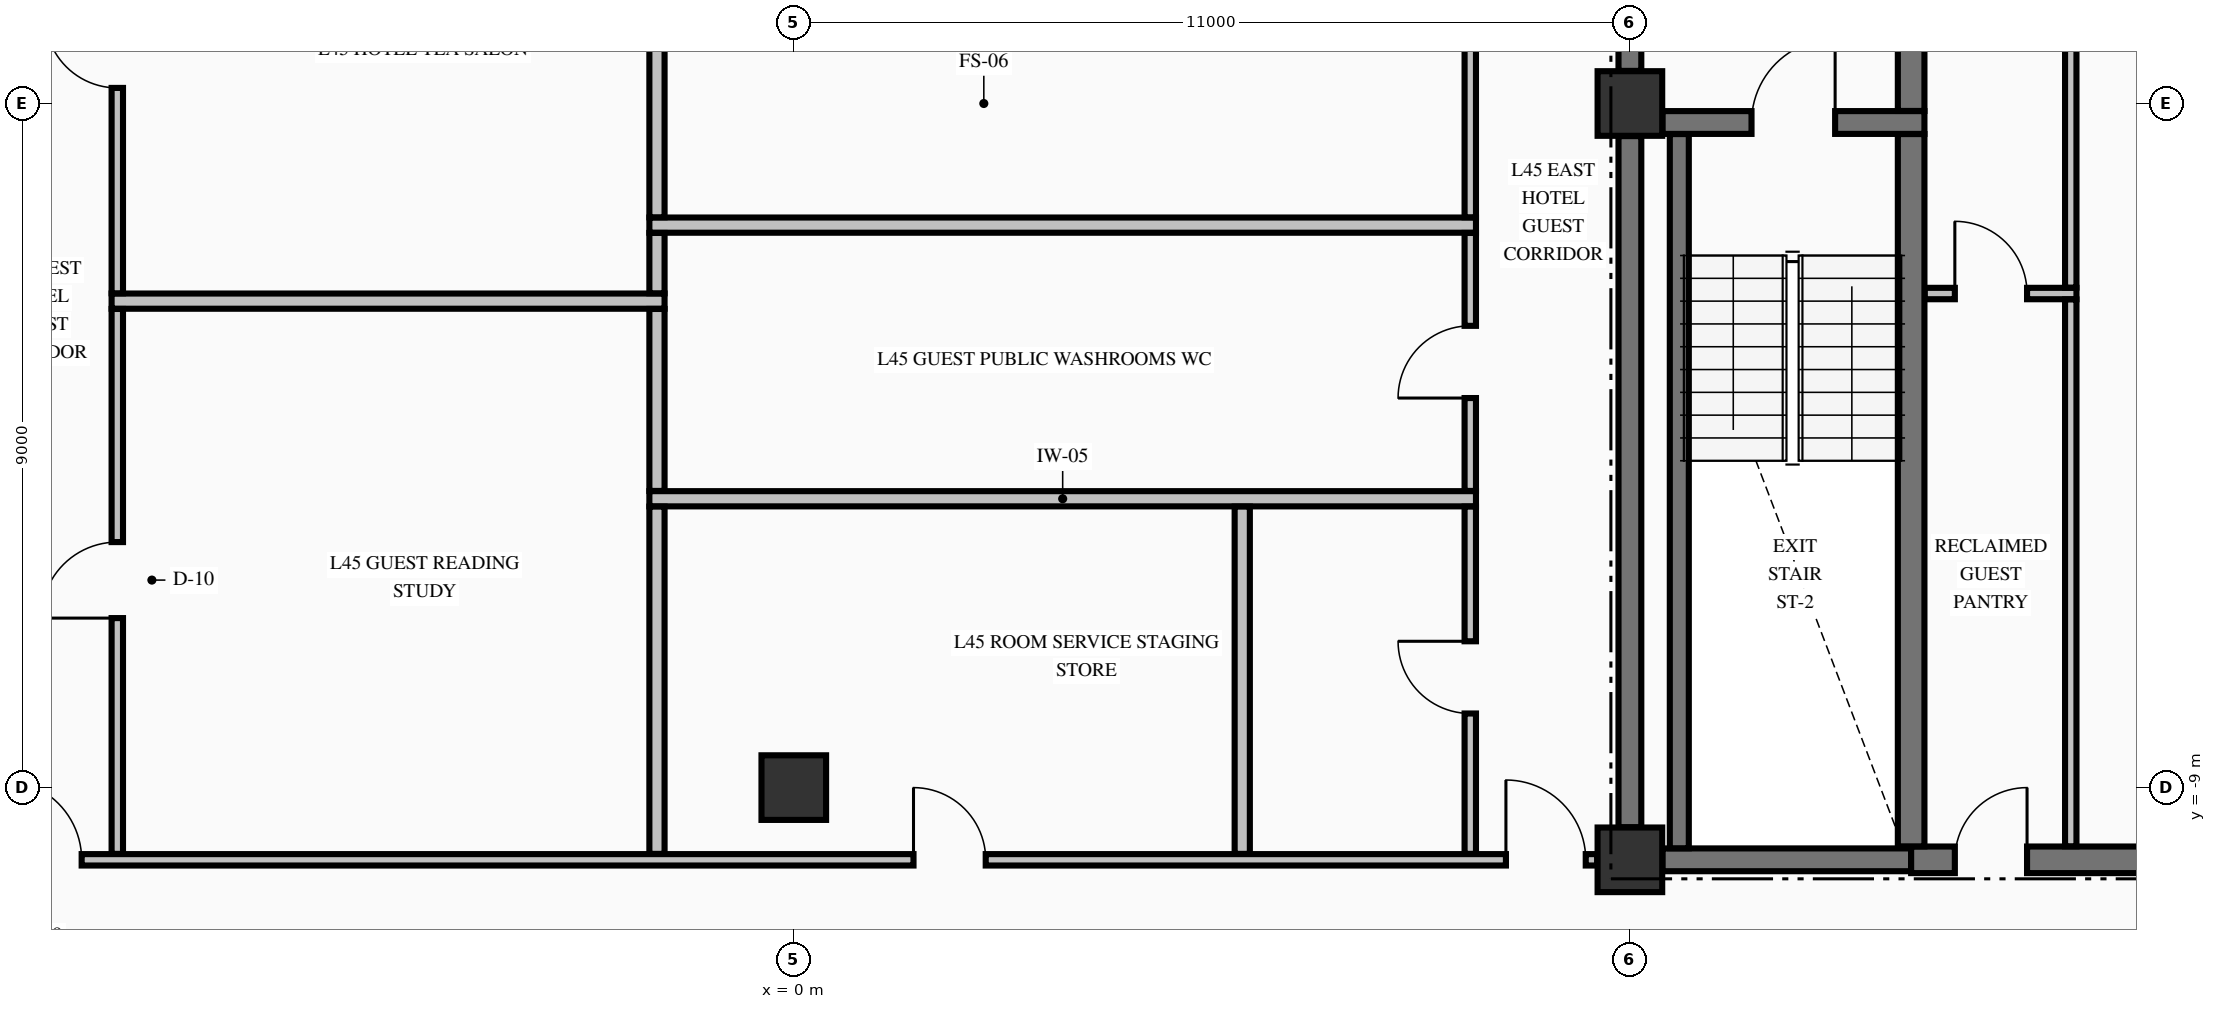
"""IFC4 building model, lengths in metres.
Left out: names, types, materials, properties, quantities, classifications, styles, units other than length and angle.
Written with IfcOpenShell. Run it as: python <this file> out.ifc"""

import sys

from ifc_helpers import new_model, si_unit, direction, frame, frame_2d, origin, origin_2d, place, context, subcontext, project, spatial, rectangle, extrude, element, fill, save


model = new_model("IFC4")
c1 = context("Model", 3, precision=1e-05, world=origin(), true_north=direction((0.0, 1.0)))
c2 = subcontext(c1, "Body", "Model", "MODEL_VIEW")
j1 = project(units=[si_unit("LENGTHUNIT", "METRE"), si_unit("PLANEANGLEUNIT", "RADIAN")], contexts=[c1])
p1 = place(None, origin())
s1 = spatial("IfcSite", under=j1, at=p1, CompositionType="ELEMENT")
p2 = place(p1, origin())
s2 = spatial("IfcBuilding", under=s1, at=p2, CompositionType="ELEMENT")
p3 = place(p2, frame((0.0, 0.0, 176.26)))
s3 = spatial("IfcBuildingStorey", under=s2, at=p3, CompositionType="ELEMENT", Elevation=176.26)
for number, where, z_axis, x_axis in (
    (1, (11.0, -9.95, -0.275), (0.0, 0.0, 1.0), (1.0, 0.0, 0.0)),
    (2, (11.0, 0.0, -0.275), (0.0, 0.0, 1.0), (1.0, 0.0, 0.0)),
    (3, (0.0, -9.0, -0.275), (0.0, 0.0, 1.0), (1.0, 0.0, 0.0)),
):
    element("IfcColumn", number, at=place(p3, frame(where, z_axis=z_axis, x_axis=x_axis)), inside=s3, PredefinedType="COLUMN", context=c2, shape_type="SweptSolid", body=[
        extrude(rectangle(XDim=0.85, YDim=0.85, at=origin_2d()), origin(), (0.0, 0.0, 1.0), 3.425),
    ])
p4 = place(p3, frame((11.429, -9.95, 0.0), z_axis=(0.0, 0.0, 1.0), x_axis=(1.0, 0.0, 0.0)))
e4 = element("IfcWall", 4, at=p4, inside=s3, PredefinedType="SHEAR", context=c2, shape_type="SweptSolid", body=[
    extrude(rectangle(XDim=3.271, YDim=0.3, at=frame_2d((1.635, 0.0))), origin(), (0.0, 0.0, 1.0), 3.15),
])
p5 = place(p3, frame((14.7, -9.95, 0.0), z_axis=(0.0, 0.0, 1.0), x_axis=(1.0, 0.0, 0.0)))
e5 = element("IfcWall", 5, at=p5, inside=s3, PredefinedType="SHEAR", context=c2, shape_type="SweptSolid", body=[
    extrude(rectangle(XDim=4.871, YDim=0.35, at=frame_2d((2.436, 0.0))), origin(), (0.0, 0.0, 1.0), 3.15),
])
p6 = place(p5, frame((3.25, 0.0, 0.0)))
e6 = element("IfcOpeningElement", 6, at=p6, cuts=e5, PredefinedType="OPENING", context=c2, shape_type="SweptSolid", body=[
    extrude(rectangle(XDim=0.9, YDim=2.15, at=frame_2d((0.45, 1.075))), frame((0.0, 0.185, 0.0), z_axis=(0.0, -1.0, 0.0), x_axis=(1.0, 0.0, 0.0)), (0.0, 0.0, 1.0), 0.37),
])
p7 = place(p5, frame((0.575, 0.0, 0.0)))
e7 = element("IfcOpeningElement", 7, at=p7, cuts=e5, PredefinedType="OPENING", context=c2, shape_type="SweptSolid", body=[
    extrude(rectangle(XDim=0.95, YDim=2.15, at=frame_2d((0.475, 1.075))), frame((0.0, 0.185, 0.0), z_axis=(0.0, -1.0, 0.0), x_axis=(1.0, 0.0, 0.0)), (0.0, 0.0, 1.0), 0.37),
])
p8 = place(p3, frame((11.429, -0.25, 0.0), z_axis=(0.0, 0.0, 1.0), x_axis=(1.0, 0.0, 0.0)))
e8 = element("IfcWall", 8, at=p8, inside=s3, PredefinedType="SHEAR", context=c2, shape_type="SweptSolid", body=[
    extrude(rectangle(XDim=3.446, YDim=0.3, at=frame_2d((1.723, 0.0))), origin(), (0.0, 0.0, 1.0), 3.15),
])
p9 = place(p8, frame((1.171, 0.0, 0.0)))
e9 = element("IfcOpeningElement", 9, at=p9, cuts=e8, PredefinedType="OPENING", context=c2, shape_type="SweptSolid", body=[
    extrude(rectangle(XDim=1.1, YDim=2.15, at=frame_2d((0.55, 1.075))), frame((0.0, 0.16, 0.0), z_axis=(0.0, -1.0, 0.0), x_axis=(1.0, 0.0, 0.0)), (0.0, 0.0, 1.0), 0.32),
])
p10 = place(p3, frame((-10.569, -9.95, 0.0), z_axis=(0.0, 0.0, 1.0), x_axis=(1.0, 0.0, 0.0)))
e10 = element("IfcWall", 10, at=p10, inside=s3, PredefinedType="PARTITIONING", context=c2, shape_type="SweptSolid", body=[
    extrude(rectangle(XDim=21.138, YDim=0.15, at=frame_2d((10.569, 0.0))), origin(), (0.0, 0.0, 1.0), 3.15),
])
p11 = place(p10, frame((0.15, 0.0, 0.0)))
e11 = element("IfcOpeningElement", 11, at=p11, cuts=e10, PredefinedType="OPENING", context=c2, shape_type="SweptSolid", body=[
    extrude(rectangle(XDim=1.05, YDim=2.15, at=frame_2d((0.525, 1.075))), frame((0.0, 0.085, 0.0), z_axis=(0.0, -1.0, 0.0), x_axis=(1.0, 0.0, 0.0)), (0.0, 0.0, 1.0), 0.17),
])
p12 = place(p10, frame((19.938, 0.0, 0.0)))
e12 = element("IfcOpeningElement", 12, at=p12, cuts=e10, PredefinedType="OPENING", context=c2, shape_type="SweptSolid", body=[
    extrude(rectangle(XDim=1.05, YDim=2.15, at=frame_2d((0.525, 1.075))), frame((0.0, 0.085, 0.0), z_axis=(0.0, -1.0, 0.0), x_axis=(1.0, 0.0, 0.0)), (0.0, 0.0, 1.0), 0.17),
])
p13 = place(p10, frame((12.144, 0.0, 0.0)))
e13 = element("IfcOpeningElement", 13, at=p13, cuts=e10, PredefinedType="OPENING", context=c2, shape_type="SweptSolid", body=[
    extrude(rectangle(XDim=0.95, YDim=2.15, at=frame_2d((0.475, 1.075))), frame((0.0, 0.085, 0.0), z_axis=(0.0, -1.0, 0.0), x_axis=(1.0, 0.0, 0.0)), (0.0, 0.0, 1.0), 0.17),
])
p14 = place(p3, frame((-1.9, -5.2, 0.0), z_axis=(0.0, 0.0, 1.0), x_axis=(1.0, 0.0, 0.0)))
e14 = element("IfcWall", 14, at=p14, inside=s3, PredefinedType="PARTITIONING", context=c2, shape_type="SweptSolid", body=[
    extrude(rectangle(XDim=10.875, YDim=0.2, at=frame_2d((5.438, 0.0))), origin(), (0.0, 0.0, 1.0), 3.15),
])
p15 = place(p3, frame((-8.975, -2.6, 0.0), z_axis=(0.0, 0.0, 1.0), x_axis=(1.0, 0.0, 0.0)))
e15 = element("IfcWall", 15, at=p15, inside=s3, PredefinedType="PARTITIONING", context=c2, shape_type="SweptSolid", body=[
    extrude(rectangle(XDim=7.275, YDim=0.2, at=frame_2d((3.638, 0.0))), origin(), (0.0, 0.0, 1.0), 3.15),
])
p16 = place(p3, frame((14.878, -2.5, 0.0), z_axis=(0.0, 0.0, 1.0), x_axis=(1.0, 0.0, 0.0)))
e16 = element("IfcWall", 16, at=p16, inside=s3, PredefinedType="PARTITIONING", context=c2, shape_type="SweptSolid", body=[
    extrude(rectangle(XDim=1.997, YDim=0.15, at=frame_2d((0.999, 0.0))), origin(), (0.0, 0.0, 1.0), 3.15),
])
p17 = place(p16, frame((0.397, 0.0, 0.0)))
e17 = element("IfcOpeningElement", 17, at=p17, cuts=e16, PredefinedType="OPENING", context=c2, shape_type="SweptSolid", body=[
    extrude(rectangle(XDim=0.95, YDim=2.15, at=frame_2d((0.475, 1.075))), frame((0.0, 0.085, 0.0), z_axis=(0.0, -1.0, 0.0), x_axis=(1.0, 0.0, 0.0)), (0.0, 0.0, 1.0), 0.17),
])
p18 = place(p3, frame((-1.9, -1.6, 0.0), z_axis=(0.0, 0.0, 1.0), x_axis=(1.0, 0.0, 0.0)))
e18 = element("IfcWall", 18, at=p18, inside=s3, PredefinedType="PARTITIONING", context=c2, shape_type="SweptSolid", body=[
    extrude(rectangle(XDim=10.875, YDim=0.2, at=frame_2d((5.438, 0.0))), origin(), (0.0, 0.0, 1.0), 3.15),
])
p19 = place(p3, frame((11.0, -9.521, 0.0), z_axis=(0.0, 0.0, 1.0), x_axis=(0.0, 1.0, 0.0)))
e19 = element("IfcWall", 19, at=p19, inside=s3, PredefinedType="SHEAR", context=c2, shape_type="SweptSolid", body=[
    extrude(rectangle(XDim=9.092, YDim=0.3, at=frame_2d((4.546, 0.0))), origin(), (0.0, 0.0, 1.0), 3.15),
])
p20 = place(p3, frame((11.0, 0.429, 0.0), z_axis=(0.0, 0.0, 1.0), x_axis=(0.0, 1.0, 0.0)))
e20 = element("IfcWall", 20, at=p20, inside=s3, PredefinedType="SHEAR", context=c2, shape_type="SweptSolid", body=[
    extrude(rectangle(XDim=2.319, YDim=0.3, at=frame_2d((1.16, 0.0))), origin(), (0.0, 0.0, 1.0), 3.15),
])
p21 = place(p20, frame((0.671, 0.0, 0.0)))
e21 = element("IfcOpeningElement", 21, at=p21, cuts=e20, PredefinedType="OPENING", context=c2, shape_type="SweptSolid", body=[
    extrude(rectangle(XDim=1.1, YDim=2.15, at=frame_2d((0.55, 1.075))), frame((0.0, 0.16, 0.0), z_axis=(0.0, -1.0, 0.0), x_axis=(1.0, 0.0, 0.0)), (0.0, 0.0, 1.0), 0.32),
])
p22 = place(p3, frame((11.65, -9.798, 0.0), z_axis=(0.0, 0.0, 1.0), x_axis=(0.0, 1.0, 0.0)))
e22 = element("IfcWall", 22, at=p22, inside=s3, PredefinedType="SOLIDWALL", context=c2, shape_type="SweptSolid", body=[
    extrude(rectangle(XDim=9.396, YDim=0.25, at=frame_2d((4.698, 0.0))), origin(), (0.0, 0.0, 1.0), 3.15),
])
p23 = place(p3, frame((14.7, -9.773, 0.0), z_axis=(0.0, 0.0, 1.0), x_axis=(0.0, 1.0, 0.0)))
e23 = element("IfcWall", 23, at=p23, inside=s3, PredefinedType="SHEAR", context=c2, shape_type="SweptSolid", body=[
    extrude(rectangle(XDim=9.371, YDim=0.35, at=frame_2d((4.686, 0.0))), origin(), (0.0, 0.0, 1.0), 3.15),
])
p24 = place(p3, frame((14.7, -0.098, 0.0), z_axis=(0.0, 0.0, 1.0), x_axis=(0.0, 1.0, 0.0)))
e24 = element("IfcWall", 24, at=p24, inside=s3, PredefinedType="SHEAR", context=c2, shape_type="SweptSolid", body=[
    extrude(rectangle(XDim=2.846, YDim=0.35, at=frame_2d((1.423, 0.0))), origin(), (0.0, 0.0, 1.0), 3.15),
])
p25 = place(p3, frame((-8.9, -9.872, 0.0), z_axis=(0.0, 0.0, 1.0), x_axis=(0.0, 1.0, 0.0)))
e25 = element("IfcWall", 25, at=p25, inside=s3, PredefinedType="PARTITIONING", context=c2, shape_type="SweptSolid", body=[
    extrude(rectangle(XDim=7.169, YDim=0.15, at=frame_2d((3.584, 0.0))), origin(), (0.0, 0.0, 1.0), 3.15),
])
p26 = place(p25, frame((3.102, 0.0, 0.0)))
e26 = element("IfcOpeningElement", 26, at=p26, cuts=e25, PredefinedType="OPENING", context=c2, shape_type="SweptSolid", body=[
    extrude(rectangle(XDim=1.0, YDim=2.15, at=frame_2d((0.5, 1.075))), frame((0.0, 0.085, 0.0), z_axis=(0.0, -1.0, 0.0), x_axis=(1.0, 0.0, 0.0)), (0.0, 0.0, 1.0), 0.17),
])
p27 = place(p3, frame((-8.9, -2.497, 0.0), z_axis=(0.0, 0.0, 1.0), x_axis=(0.0, 1.0, 0.0)))
e27 = element("IfcWall", 27, at=p27, inside=s3, PredefinedType="PARTITIONING", context=c2, shape_type="SweptSolid", body=[
    extrude(rectangle(XDim=6.344, YDim=0.15, at=frame_2d((3.172, 0.0))), origin(), (0.0, 0.0, 1.0), 3.15),
])
p28 = place(p27, frame((2.702, 0.0, 0.0)))
e28 = element("IfcOpeningElement", 28, at=p28, cuts=e27, PredefinedType="OPENING", context=c2, shape_type="SweptSolid", body=[
    extrude(rectangle(XDim=0.95, YDim=2.15, at=frame_2d((0.475, 1.075))), frame((0.0, 0.085, 0.0), z_axis=(0.0, -1.0, 0.0), x_axis=(1.0, 0.0, 0.0)), (0.0, 0.0, 1.0), 0.17),
])
p29 = place(p3, frame((-1.8, -9.872, 0.0), z_axis=(0.0, 0.0, 1.0), x_axis=(0.0, 1.0, 0.0)))
e29 = element("IfcWall", 29, at=p29, inside=s3, PredefinedType="PARTITIONING", context=c2, shape_type="SweptSolid", body=[
    extrude(rectangle(XDim=4.569, YDim=0.2, at=frame_2d((2.285, 0.0))), origin(), (0.0, 0.0, 1.0), 3.15),
])
p30 = place(p3, frame((-1.8, -5.097, 0.0), z_axis=(0.0, 0.0, 1.0), x_axis=(0.0, 1.0, 0.0)))
e30 = element("IfcWall", 30, at=p30, inside=s3, PredefinedType="PARTITIONING", context=c2, shape_type="SweptSolid", body=[
    extrude(rectangle(XDim=2.394, YDim=0.2, at=frame_2d((1.197, 0.0))), origin(), (0.0, 0.0, 1.0), 3.15),
])
p31 = place(p3, frame((-1.8, -2.497, 0.0), z_axis=(0.0, 0.0, 1.0), x_axis=(0.0, 1.0, 0.0)))
e31 = element("IfcWall", 31, at=p31, inside=s3, PredefinedType="PARTITIONING", context=c2, shape_type="SweptSolid", body=[
    extrude(rectangle(XDim=0.794, YDim=0.2, at=frame_2d((0.397, 0.0))), origin(), (0.0, 0.0, 1.0), 3.15),
])
p32 = place(p3, frame((-1.8, -1.497, 0.0), z_axis=(0.0, 0.0, 1.0), x_axis=(0.0, 1.0, 0.0)))
e32 = element("IfcWall", 32, at=p32, inside=s3, PredefinedType="PARTITIONING", context=c2, shape_type="SweptSolid", body=[
    extrude(rectangle(XDim=5.344, YDim=0.2, at=frame_2d((2.672, 0.0))), origin(), (0.0, 0.0, 1.0), 3.15),
])
p33 = place(p3, frame((5.9, -9.872, 0.0), z_axis=(0.0, 0.0, 1.0), x_axis=(0.0, 1.0, 0.0)))
e33 = element("IfcWall", 33, at=p33, inside=s3, PredefinedType="PARTITIONING", context=c2, shape_type="SweptSolid", body=[
    extrude(rectangle(XDim=4.569, YDim=0.2, at=frame_2d((2.285, 0.0))), origin(), (0.0, 0.0, 1.0), 3.15),
])
p34 = place(p3, frame((8.9, -9.872, 0.0), z_axis=(0.0, 0.0, 1.0), x_axis=(0.0, 1.0, 0.0)))
e34 = element("IfcWall", 34, at=p34, inside=s3, PredefinedType="PARTITIONING", context=c2, shape_type="SweptSolid", body=[
    extrude(rectangle(XDim=4.569, YDim=0.15, at=frame_2d((2.285, 0.0))), origin(), (0.0, 0.0, 1.0), 3.15),
])
p35 = place(p34, frame((1.847, 0.0, 0.0)))
e35 = element("IfcOpeningElement", 35, at=p35, cuts=e34, PredefinedType="OPENING", context=c2, shape_type="SweptSolid", body=[
    extrude(rectangle(XDim=0.95, YDim=2.15, at=frame_2d((0.475, 1.075))), frame((0.0, 0.085, 0.0), z_axis=(0.0, -1.0, 0.0), x_axis=(1.0, 0.0, 0.0)), (0.0, 0.0, 1.0), 0.17),
])
p36 = place(p3, frame((8.9, -5.097, 0.0), z_axis=(0.0, 0.0, 1.0), x_axis=(0.0, 1.0, 0.0)))
e36 = element("IfcWall", 36, at=p36, inside=s3, PredefinedType="PARTITIONING", context=c2, shape_type="SweptSolid", body=[
    extrude(rectangle(XDim=3.394, YDim=0.15, at=frame_2d((1.697, 0.0))), origin(), (0.0, 0.0, 1.0), 3.15),
])
p37 = place(p36, frame((1.222, 0.0, 0.0)))
e37 = element("IfcOpeningElement", 37, at=p37, cuts=e36, PredefinedType="OPENING", context=c2, shape_type="SweptSolid", body=[
    extrude(rectangle(XDim=0.95, YDim=2.15, at=frame_2d((0.475, 1.075))), frame((0.0, 0.085, 0.0), z_axis=(0.0, -1.0, 0.0), x_axis=(1.0, 0.0, 0.0)), (0.0, 0.0, 1.0), 0.17),
])
p38 = place(p3, frame((8.9, -1.497, 0.0), z_axis=(0.0, 0.0, 1.0), x_axis=(0.0, 1.0, 0.0)))
e38 = element("IfcWall", 38, at=p38, inside=s3, PredefinedType="PARTITIONING", context=c2, shape_type="SweptSolid", body=[
    extrude(rectangle(XDim=11.919, YDim=0.15, at=frame_2d((5.959, 0.0))), origin(), (0.0, 0.0, 1.0), 3.15),
])
p39 = place(p38, frame((5.397, 0.0, 0.0)))
e39 = element("IfcOpeningElement", 39, at=p39, cuts=e38, PredefinedType="OPENING", context=c2, shape_type="SweptSolid", body=[
    extrude(rectangle(XDim=1.1, YDim=2.15, at=frame_2d((0.55, 1.075))), frame((0.0, 0.085, 0.0), z_axis=(0.0, -1.0, 0.0), x_axis=(1.0, 0.0, 0.0)), (0.0, 0.0, 1.0), 0.17),
])
p40 = place(p3, frame((16.8, -9.772, 0.0), z_axis=(0.0, 0.0, 1.0), x_axis=(0.0, 1.0, 0.0)))
e40 = element("IfcWall", 40, at=p40, inside=s3, PredefinedType="PARTITIONING", context=c2, shape_type="SweptSolid", body=[
    extrude(rectangle(XDim=7.194, YDim=0.15, at=frame_2d((3.597, 0.0))), origin(), (0.0, 0.0, 1.0), 3.15),
])
p41 = place(p3, frame((16.8, -2.422, 0.0), z_axis=(0.0, 0.0, 1.0), x_axis=(0.0, 1.0, 0.0)))
e41 = element("IfcWall", 41, at=p41, inside=s3, PredefinedType="PARTITIONING", context=c2, shape_type="SweptSolid", body=[
    extrude(rectangle(XDim=7.144, YDim=0.15, at=frame_2d((3.572, 0.0))), origin(), (0.0, 0.0, 1.0), 3.15),
])
p42 = place(p9, origin())
e42 = element("IfcDoor", 42, at=p42, inside=s3, OperationType="SINGLE_SWING_RIGHT", PredefinedType="DOOR", context=c2, shape_type="SweptSolid", body=[
    extrude(rectangle(XDim=1.1, YDim=2.15, at=frame_2d((0.55, 1.075))), frame((0.0, 0.025, 0.0), z_axis=(0.0, -1.0, 0.0), x_axis=(1.0, 0.0, 0.0)), (0.0, 0.0, 1.0), 0.05),
])
fill(e9, e42)
p43 = place(p7, origin())
e43 = element("IfcDoor", 43, at=p43, inside=s3, OperationType="SINGLE_SWING_RIGHT", PredefinedType="DOOR", context=c2, shape_type="SweptSolid", body=[
    extrude(rectangle(XDim=0.95, YDim=2.15, at=frame_2d((0.475, 1.075))), frame((0.0, 0.025, 0.0), z_axis=(0.0, -1.0, 0.0), x_axis=(1.0, 0.0, 0.0)), (0.0, 0.0, 1.0), 0.05),
])
fill(e7, e43)
p44 = place(p17, origin())
e44 = element("IfcDoor", 44, at=p44, inside=s3, OperationType="SINGLE_SWING_LEFT", PredefinedType="DOOR", context=c2, shape_type="SweptSolid", body=[
    extrude(rectangle(XDim=0.95, YDim=2.15, at=frame_2d((0.475, 1.075))), frame((0.0, 0.025, 0.0), z_axis=(0.0, -1.0, 0.0), x_axis=(1.0, 0.0, 0.0)), (0.0, 0.0, 1.0), 0.05),
])
fill(e17, e44)
p45 = place(p11, origin())
e45 = element("IfcDoor", 45, at=p45, inside=s3, OperationType="SINGLE_SWING_LEFT", PredefinedType="DOOR", context=c2, shape_type="SweptSolid", body=[
    extrude(rectangle(XDim=1.05, YDim=2.15, at=frame_2d((0.525, 1.075))), frame((0.0, 0.025, 0.0), z_axis=(0.0, -1.0, 0.0), x_axis=(1.0, 0.0, 0.0)), (0.0, 0.0, 1.0), 0.05),
])
fill(e11, e45)
p46 = place(p12, origin())
e46 = element("IfcDoor", 46, at=p46, inside=s3, OperationType="SINGLE_SWING_LEFT", PredefinedType="DOOR", context=c2, shape_type="SweptSolid", body=[
    extrude(rectangle(XDim=1.05, YDim=2.15, at=frame_2d((0.525, 1.075))), frame((0.0, 0.025, 0.0), z_axis=(0.0, -1.0, 0.0), x_axis=(1.0, 0.0, 0.0)), (0.0, 0.0, 1.0), 0.05),
])
fill(e12, e46)
p47 = place(p28, origin())
e47 = element("IfcDoor", 47, at=p47, inside=s3, OperationType="SINGLE_SWING_RIGHT", PredefinedType="DOOR", context=c2, shape_type="SweptSolid", body=[
    extrude(rectangle(XDim=0.95, YDim=2.15, at=frame_2d((0.475, 1.075))), frame((0.0, 0.025, 0.0), z_axis=(0.0, -1.0, 0.0), x_axis=(1.0, 0.0, 0.0)), (0.0, 0.0, 1.0), 0.05),
])
fill(e28, e47)
p48 = place(p26, origin())
e48 = element("IfcDoor", 48, at=p48, inside=s3, OperationType="SINGLE_SWING_LEFT", PredefinedType="DOOR", context=c2, shape_type="SweptSolid", body=[
    extrude(rectangle(XDim=1.0, YDim=2.15, at=frame_2d((0.5, 1.075))), frame((0.0, 0.025, 0.0), z_axis=(0.0, -1.0, 0.0), x_axis=(1.0, 0.0, 0.0)), (0.0, 0.0, 1.0), 0.05),
])
fill(e26, e48)
p49 = place(p37, origin())
e49 = element("IfcDoor", 49, at=p49, inside=s3, OperationType="SINGLE_SWING_LEFT", PredefinedType="DOOR", context=c2, shape_type="SweptSolid", body=[
    extrude(rectangle(XDim=0.95, YDim=2.15, at=frame_2d((0.475, 1.075))), frame((0.0, 0.025, 0.0), z_axis=(0.0, -1.0, 0.0), x_axis=(1.0, 0.0, 0.0)), (0.0, 0.0, 1.0), 0.05),
])
fill(e37, e49)
p50 = place(p35, origin())
e50 = element("IfcDoor", 50, at=p50, inside=s3, OperationType="SINGLE_SWING_RIGHT", PredefinedType="DOOR", context=c2, shape_type="SweptSolid", body=[
    extrude(rectangle(XDim=0.95, YDim=2.15, at=frame_2d((0.475, 1.075))), frame((0.0, 0.025, 0.0), z_axis=(0.0, -1.0, 0.0), x_axis=(1.0, 0.0, 0.0)), (0.0, 0.0, 1.0), 0.05),
])
fill(e35, e50)
p51 = place(p13, origin())
e51 = element("IfcDoor", 51, at=p51, inside=s3, OperationType="SINGLE_SWING_LEFT", PredefinedType="DOOR", context=c2, shape_type="SweptSolid", body=[
    extrude(rectangle(XDim=0.95, YDim=2.15, at=frame_2d((0.475, 1.075))), frame((0.0, 0.025, 0.0), z_axis=(0.0, -1.0, 0.0), x_axis=(1.0, 0.0, 0.0)), (0.0, 0.0, 1.0), 0.05),
])
fill(e13, e51)
save(model, sys.argv[1])
